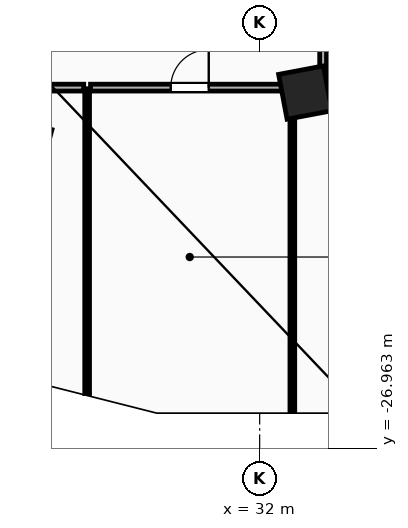
"""IFC4 building model, lengths in metres.
Left out: names, types, materials, properties, quantities, classifications, styles, units other than length and angle.
Written with IfcOpenShell. Run it as: python <this file> out.ifc"""

import sys

from ifc_helpers import new_model, si_unit, direction, frame, frame_2d, origin, origin_2d, place, context, subcontext, project, spatial, rectangle, extrude, element, fill, save


model = new_model("IFC4")
c1 = context("Model", 3, precision=1e-05, world=origin(), true_north=direction((0.0, 1.0)))
c2 = subcontext(c1, "Body", "Model", "MODEL_VIEW")
j1 = project(units=[si_unit("LENGTHUNIT", "METRE"), si_unit("PLANEANGLEUNIT", "RADIAN")], contexts=[c1])
p1 = place(None, origin())
s1 = spatial("IfcSite", under=j1, at=p1, CompositionType="ELEMENT")
p2 = place(p1, origin())
s2 = spatial("IfcBuilding", under=s1, at=p2, CompositionType="ELEMENT")
p3 = place(p2, frame((0.0, 0.0, 39.2)))
s3 = spatial("IfcBuildingStorey", under=s2, at=p3, CompositionType="ELEMENT", Elevation=39.2)
for number, where, z_axis, x_axis in (
    (1, (25.8, -19.0, 0.0), (0.0, 0.0, 1.0), (0.966, -0.259, 0.0)),
    (2, (33.2, -17.6, 0.0), (0.0, 0.0, 1.0), (0.983, 0.186, 0.0)),
):
    element("IfcColumn", number, at=place(p3, frame(where, z_axis=z_axis, x_axis=x_axis)), inside=s3, PredefinedType="COLUMN", context=c2, shape_type="SweptSolid", body=[
        extrude(rectangle(XDim=1.2, YDim=1.2, at=origin_2d()), origin(), (0.0, 0.0, 1.0), 3.8),
    ])
p4 = place(p3, frame((27.46, -25.521, 0.0), z_axis=(0.0, 0.0, 1.0), x_axis=(0.0, 1.0, 0.0)))
e3 = element("IfcWall", 3, at=p4, inside=s3, PredefinedType="PARTITIONING", context=c2, shape_type="SweptSolid", body=[
    extrude(rectangle(XDim=8.021, YDim=0.125, at=frame_2d((4.01, 0.0))), origin(), (0.0, 0.0, 1.0), 3.5),
])
p5 = place(p3, frame((32.86, -25.985, 0.0), z_axis=(0.0, 0.0, 1.0), x_axis=(0.0, 1.0, 0.0)))
e4 = element("IfcWall", 4, at=p5, inside=s3, PredefinedType="PARTITIONING", context=c2, shape_type="SweptSolid", body=[
    extrude(rectangle(XDim=8.485, YDim=0.125, at=frame_2d((4.243, 0.0))), origin(), (0.0, 0.0, 1.0), 3.5),
])
p6 = place(p3, frame((27.55, -17.47, 0.0), z_axis=(0.0, 0.0, 1.0), x_axis=(1.0, 0.0, 0.0)))
e5 = element("IfcWall", 5, at=p6, inside=s3, PredefinedType="PARTITIONING", context=c2, shape_type="SweptSolid", body=[
    extrude(rectangle(XDim=5.22, YDim=0.18, at=frame_2d((2.61, 0.0))), origin(), (0.0, 0.0, 1.0), 3.5),
])
p7 = place(p6, frame((2.11, 0.0, 0.0)))
e6 = element("IfcOpeningElement", 6, at=p7, cuts=e5, PredefinedType="OPENING", context=c2, shape_type="SweptSolid", body=[
    extrude(rectangle(XDim=1.0, YDim=2.15, at=frame_2d((0.5, 1.075))), frame((0.0, 0.1, 0.0), z_axis=(0.0, -1.0, 0.0), x_axis=(1.0, 0.0, 0.0)), (0.0, 0.0, 1.0), 0.2),
])
p8 = place(p3, frame((33.67, -17.428, 0.0), z_axis=(0.0, 0.0, 1.0), x_axis=(0.0, 1.0, 0.0)))
e7 = element("IfcWall", 7, at=p8, inside=s3, PredefinedType="PARTITIONING", context=c2, shape_type="SweptSolid", body=[
    extrude(rectangle(XDim=5.719, YDim=0.18, at=frame_2d((2.859, 0.0))), origin(), (0.0, 0.0, 1.0), 3.5),
])
p9 = place(p8, frame((2.359, 0.0, 0.0)))
e8 = element("IfcOpeningElement", 8, at=p9, cuts=e7, PredefinedType="OPENING", context=c2, shape_type="SweptSolid", body=[
    extrude(rectangle(XDim=1.0, YDim=2.15, at=frame_2d((0.5, 1.075))), frame((0.0, 0.1, 0.0), z_axis=(0.0, -1.0, 0.0), x_axis=(1.0, 0.0, 0.0)), (0.0, 0.0, 1.0), 0.2),
])
p10 = place(p3, frame((32.95, -17.47, 0.0), z_axis=(0.0, 0.0, 1.0), x_axis=(1.0, 0.0, 0.0)))
e9 = element("IfcWall", 9, at=p10, inside=s3, PredefinedType="PARTITIONING", context=c2, shape_type="SweptSolid", body=[
    extrude(rectangle(XDim=0.678, YDim=0.18, at=frame_2d((0.339, 0.0))), origin(), (0.0, 0.0, 1.0), 3.5),
])
p11 = place(p3, frame((16.822, -17.47, 0.0), z_axis=(0.0, 0.0, 1.0), x_axis=(1.0, 0.0, 0.0)))
e10 = element("IfcWall", 10, at=p11, inside=s3, PredefinedType="PARTITIONING", context=c2, shape_type="SweptSolid", body=[
    extrude(rectangle(XDim=10.549, YDim=0.18, at=frame_2d((5.274, 0.0))), origin(), (0.0, 0.0, 1.0), 3.5),
])
p12 = place(p7, origin())
e11 = element("IfcDoor", 11, at=p12, inside=s3, OperationType="SINGLE_SWING_RIGHT", PredefinedType="DOOR", context=c2, shape_type="SweptSolid", body=[
    extrude(rectangle(XDim=1.0, YDim=2.15, at=frame_2d((0.5, 1.075))), frame((0.0, 0.025, 0.0), z_axis=(0.0, -1.0, 0.0), x_axis=(1.0, 0.0, 0.0)), (0.0, 0.0, 1.0), 0.05),
])
fill(e6, e11)
save(model, sys.argv[1])
